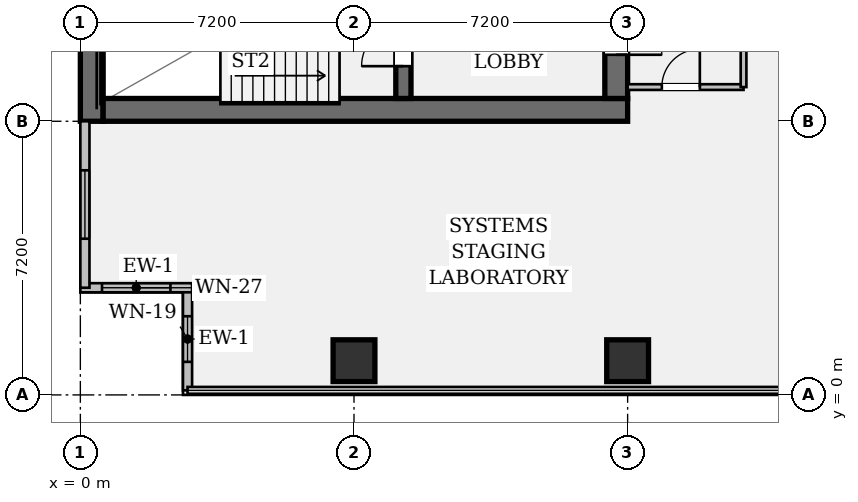
"""IFC4 building model, lengths in metres.
Left out: names, types, materials, properties, quantities, classifications, styles, units other than length and angle.
Written with IfcOpenShell. Run it as: python <this file> out.ifc"""

import sys

from ifc_helpers import new_model, si_unit, direction, frame, frame_2d, origin, origin_2d, place, context, subcontext, project, spatial, rectangle, hollow_rectangle, extrude, element, fill, save


model = new_model("IFC4")
c1 = context("Model", 3, precision=1e-05, world=origin(), true_north=direction((0.0, 1.0)))
c2 = subcontext(c1, "Body", "Model", "MODEL_VIEW")
j1 = project(units=[si_unit("LENGTHUNIT", "METRE"), si_unit("PLANEANGLEUNIT", "RADIAN")], contexts=[c1])
p1 = place(None, origin())
s1 = spatial("IfcSite", under=j1, at=p1, CompositionType="ELEMENT")
p2 = place(p1, origin())
s2 = spatial("IfcBuilding", under=s1, at=p2, CompositionType="ELEMENT")
p3 = place(p2, frame((0.0, 0.0, 17.85)))
s3 = spatial("IfcBuildingStorey", under=s2, at=p3, CompositionType="ELEMENT", Elevation=17.85)
p4 = place(p3, frame((0.3, 7.2, 0.0), z_axis=(0.0, 0.0, 1.0), x_axis=(0.0, 1.0, 0.0)))
e1 = element("IfcWall", 1, at=p4, inside=s3, PredefinedType="SHEAR", context=c2, shape_type="SweptSolid", body=[
    extrude(rectangle(XDim=28.8, YDim=0.6, at=frame_2d((14.4, 0.0))), origin(), (0.0, 0.0, 1.0), 3.91),
])
p5 = place(p3, frame((0.6, 7.5, 0.0), z_axis=(0.0, 0.0, 1.0), x_axis=(1.0, 0.0, 0.0)))
e2 = element("IfcWall", 2, at=p5, inside=s3, PredefinedType="SHEAR", context=c2, shape_type="SweptSolid", body=[
    extrude(rectangle(XDim=13.8, YDim=0.6, at=frame_2d((6.9, 0.0))), origin(), (0.0, 0.0, 1.0), 3.91),
])
p6 = place(p3, frame((14.1, 35.4, 0.0), z_axis=(0.0, 0.0, 1.0), x_axis=(0.0, -1.0, 0.0)))
e3 = element("IfcWall", 3, at=p6, inside=s3, PredefinedType="SHEAR", context=c2, shape_type="SweptSolid", body=[
    extrude(rectangle(XDim=27.6, YDim=0.6, at=frame_2d((13.8, 0.0))), origin(), (0.0, 0.0, 1.0), 3.91),
])
p7 = place(p6, frame((1.3, 0.0, 0.0)))
e4 = element("IfcOpeningElement", 4, at=p7, cuts=e3, PredefinedType="OPENING", context=c2, shape_type="SweptSolid", body=[
    extrude(rectangle(XDim=1.2, YDim=2.15, at=frame_2d((0.6, 1.075))), frame((0.0, 0.312, 0.0), z_axis=(0.0, -1.0, 0.0), x_axis=(1.0, 0.0, 0.0)), (0.0, 0.0, 1.0), 0.624),
])
p8 = place(p6, frame((25.25, 0.0, 0.0)))
e5 = element("IfcOpeningElement", 5, at=p8, cuts=e3, PredefinedType="OPENING", context=c2, shape_type="SweptSolid", body=[
    extrude(rectangle(XDim=1.2, YDim=2.15, at=frame_2d((0.6, 1.075))), frame((0.0, 0.312, 0.0), z_axis=(0.0, -1.0, 0.0), x_axis=(1.0, 0.0, 0.0)), (0.0, 0.0, 1.0), 0.624),
])
p9 = place(p6, frame((14.6, 0.0, 0.0)))
e6 = element("IfcOpeningElement", 6, at=p9, cuts=e3, PredefinedType="OPENING", context=c2, shape_type="SweptSolid", body=[
    extrude(rectangle(XDim=1.6, YDim=2.2, at=frame_2d((0.8, 1.1))), frame((0.0, 0.312, 0.0), z_axis=(0.0, -1.0, 0.0), x_axis=(1.0, 0.0, 0.0)), (0.0, 0.0, 1.0), 0.624),
])
p10 = place(p3, frame((8.5, 7.8, 0.0), z_axis=(0.0, 0.0, 1.0), x_axis=(0.0, 1.0, 0.0)))
e7 = element("IfcWall", 7, at=p10, inside=s3, PredefinedType="SHEAR", context=c2, shape_type="SweptSolid", body=[
    extrude(rectangle(XDim=3.68, YDim=0.4, at=frame_2d((1.84, 0.0))), origin(), (0.0, 0.0, 1.0), 3.91),
])
p11 = place(p10, frame((0.85, 0.0, 0.0)))
e8 = element("IfcOpeningElement", 8, at=p11, cuts=e7, PredefinedType="OPENING", context=c2, shape_type="SweptSolid", body=[
    extrude(rectangle(XDim=1.1, YDim=2.15, at=frame_2d((0.55, 1.075))), frame((0.0, 0.212, 0.0), z_axis=(0.0, -1.0, 0.0), x_axis=(1.0, 0.0, 0.0)), (0.0, 0.0, 1.0), 0.424),
])
for number, where, z_axis, x_axis in (
    (9, (7.2, 0.9, 0.0), (0.0, 0.0, 1.0), (1.0, 0.0, 0.0)),
    (10, (14.4, 0.9, 0.0), (0.0, 0.0, 1.0), (1.0, 0.0, 0.0)),
):
    element("IfcColumn", number, at=place(p3, frame(where, z_axis=z_axis, x_axis=x_axis)), inside=s3, PredefinedType="COLUMN", context=c2, shape_type="SweptSolid", body=[
        extrude(hollow_rectangle(XDim=1.1, YDim=1.1, WallThickness=0.07, at=origin_2d()), origin(), (0.0, 0.0, 1.0), 3.91),
    ])
p12 = place(p3, frame((2.82, 0.12, 0.0), z_axis=(0.0, 0.0, 1.0), x_axis=(0.0, 1.0, 0.0)))
e11 = element("IfcWall", 11, at=p12, inside=s3, PredefinedType="STANDARD", context=c2, shape_type="SweptSolid", body=[
    extrude(rectangle(XDim=2.7, YDim=0.24, at=frame_2d((1.35, 0.0))), origin(), (0.0, 0.0, 1.0), 3.91),
])
p13 = place(p12, frame((0.75, 0.0, 0.95)))
e12 = element("IfcOpeningElement", 12, at=p13, cuts=e11, PredefinedType="OPENING", context=c2, shape_type="SweptSolid", body=[
    extrude(rectangle(XDim=1.2, YDim=1.8, at=frame_2d((0.6, 0.9))), frame((0.0, 0.132, 0.0), z_axis=(0.0, -1.0, 0.0), x_axis=(1.0, 0.0, 0.0)), (0.0, 0.0, 1.0), 0.264),
])
p14 = place(p3, frame((2.94, 2.82, 0.0), z_axis=(0.0, 0.0, 1.0), x_axis=(-1.0, 0.0, 0.0)))
e13 = element("IfcWall", 13, at=p14, inside=s3, PredefinedType="STANDARD", context=c2, shape_type="SweptSolid", body=[
    extrude(rectangle(XDim=2.94, YDim=0.24, at=frame_2d((1.47, 0.0))), origin(), (0.0, 0.0, 1.0), 3.91),
])
p15 = place(p14, frame((0.57, 0.0, 0.95)))
e14 = element("IfcOpeningElement", 14, at=p15, cuts=e13, PredefinedType="OPENING", context=c2, shape_type="SweptSolid", body=[
    extrude(rectangle(XDim=1.8, YDim=1.35, at=frame_2d((0.9, 0.675))), frame((0.0, 0.132, 0.0), z_axis=(0.0, -1.0, 0.0), x_axis=(1.0, 0.0, 0.0)), (0.0, 0.0, 1.0), 0.264),
])
p16 = place(p3, frame((0.12, 2.82, 0.0), z_axis=(0.0, 0.0, 1.0), x_axis=(0.0, 1.0, 0.0)))
e15 = element("IfcWall", 15, at=p16, inside=s3, PredefinedType="STANDARD", context=c2, shape_type="SweptSolid", body=[
    extrude(rectangle(XDim=4.38, YDim=0.24, at=frame_2d((2.19, 0.0))), origin(), (0.0, 0.0, 1.0), 3.91),
])
p17 = place(p16, frame((1.29, 0.0, 0.95)))
e16 = element("IfcOpeningElement", 16, at=p17, cuts=e15, PredefinedType="OPENING", context=c2, shape_type="SweptSolid", body=[
    extrude(rectangle(XDim=1.8, YDim=1.8, at=frame_2d((0.9, 0.9))), frame((0.0, 0.132, 0.0), z_axis=(0.0, -1.0, 0.0), x_axis=(1.0, 0.0, 0.0)), (0.0, 0.0, 1.0), 0.264),
])
p18 = place(p3, frame((14.4, 8.1, 0.0), z_axis=(0.0, 0.0, 1.0), x_axis=(1.0, 0.0, 0.0)))
e17 = element("IfcWall", 17, at=p18, inside=s3, PredefinedType="PARTITIONING", context=c2, shape_type="SweptSolid", body=[
    extrude(rectangle(XDim=3.05, YDim=0.15, at=frame_2d((1.525, 0.0))), origin(), (0.0, 0.0, 1.0), 2.968),
])
p19 = place(p18, frame((0.9, 0.0, 0.0)))
e18 = element("IfcOpeningElement", 18, at=p19, cuts=e17, PredefinedType="OPENING", context=c2, shape_type="SweptSolid", body=[
    extrude(rectangle(XDim=1.0, YDim=2.15, at=frame_2d((0.5, 1.075))), frame((0.0, 0.087, 0.0), z_axis=(0.0, -1.0, 0.0), x_axis=(1.0, 0.0, 0.0)), (0.0, 0.0, 1.0), 0.174),
])
p20 = place(p3, frame((17.45, 8.1, 0.0), z_axis=(0.0, 0.0, 1.0), x_axis=(0.0, 1.0, 0.0)))
e19 = element("IfcWall", 19, at=p20, inside=s3, PredefinedType="PARTITIONING", context=c2, shape_type="SweptSolid", body=[
    extrude(rectangle(XDim=16.2, YDim=0.15, at=frame_2d((8.1, 0.0))), origin(), (0.0, 0.0, 1.0), 2.968),
])
p21 = place(p13, origin())
e20 = element("IfcWindow", 20, at=p21, inside=s3, PartitioningType="SINGLE_PANEL", PredefinedType="WINDOW", context=c2, shape_type="SweptSolid", body=[
    extrude(rectangle(XDim=1.2, YDim=1.8, at=frame_2d((0.6, 0.9))), frame((0.0, 0.03, 0.0), z_axis=(0.0, -1.0, 0.0), x_axis=(1.0, 0.0, 0.0)), (0.0, 0.0, 1.0), 0.06),
])
fill(e12, e20)
p22 = place(p15, origin())
e21 = element("IfcWindow", 21, at=p22, inside=s3, PartitioningType="SINGLE_PANEL", PredefinedType="WINDOW", context=c2, shape_type="SweptSolid", body=[
    extrude(rectangle(XDim=1.8, YDim=1.35, at=frame_2d((0.9, 0.675))), frame((0.0, 0.03, 0.0), z_axis=(0.0, -1.0, 0.0), x_axis=(1.0, 0.0, 0.0)), (0.0, 0.0, 1.0), 0.06),
])
fill(e14, e21)
p23 = place(p17, origin())
e22 = element("IfcWindow", 22, at=p23, inside=s3, PartitioningType="SINGLE_PANEL", PredefinedType="WINDOW", context=c2, shape_type="SweptSolid", body=[
    extrude(rectangle(XDim=1.8, YDim=1.8, at=frame_2d((0.9, 0.9))), frame((0.0, 0.03, 0.0), z_axis=(0.0, -1.0, 0.0), x_axis=(1.0, 0.0, 0.0)), (0.0, 0.0, 1.0), 0.06),
])
fill(e16, e22)
p24 = place(p11, origin())
e23 = element("IfcDoor", 23, at=p24, inside=s3, OperationType="SINGLE_SWING_LEFT", PredefinedType="DOOR", context=c2, shape_type="SweptSolid", body=[
    extrude(rectangle(XDim=1.1, YDim=2.15, at=frame_2d((0.55, 1.075))), frame((0.0, 0.025, 0.0), z_axis=(0.0, -1.0, 0.0), x_axis=(1.0, 0.0, 0.0)), (0.0, 0.0, 1.0), 0.05),
])
fill(e8, e23)
p25 = place(p8, origin())
e24 = element("IfcDoor", 24, at=p25, inside=s3, OperationType="SINGLE_SWING_RIGHT", PredefinedType="DOOR", context=c2, shape_type="SweptSolid", body=[
    extrude(rectangle(XDim=1.2, YDim=2.15, at=frame_2d((0.6, 1.075))), frame((0.0, 0.025, 0.0), z_axis=(0.0, -1.0, 0.0), x_axis=(1.0, 0.0, 0.0)), (0.0, 0.0, 1.0), 0.05),
])
fill(e5, e24)
p26 = place(p19, origin())
e25 = element("IfcDoor", 25, at=p26, inside=s3, OperationType="SINGLE_SWING_RIGHT", PredefinedType="DOOR", context=c2, shape_type="SweptSolid", body=[
    extrude(rectangle(XDim=1.0, YDim=2.15, at=frame_2d((0.5, 1.075))), frame((0.0, 0.025, 0.0), z_axis=(0.0, -1.0, 0.0), x_axis=(1.0, 0.0, 0.0)), (0.0, 0.0, 1.0), 0.05),
])
fill(e18, e25)
save(model, sys.argv[1])
